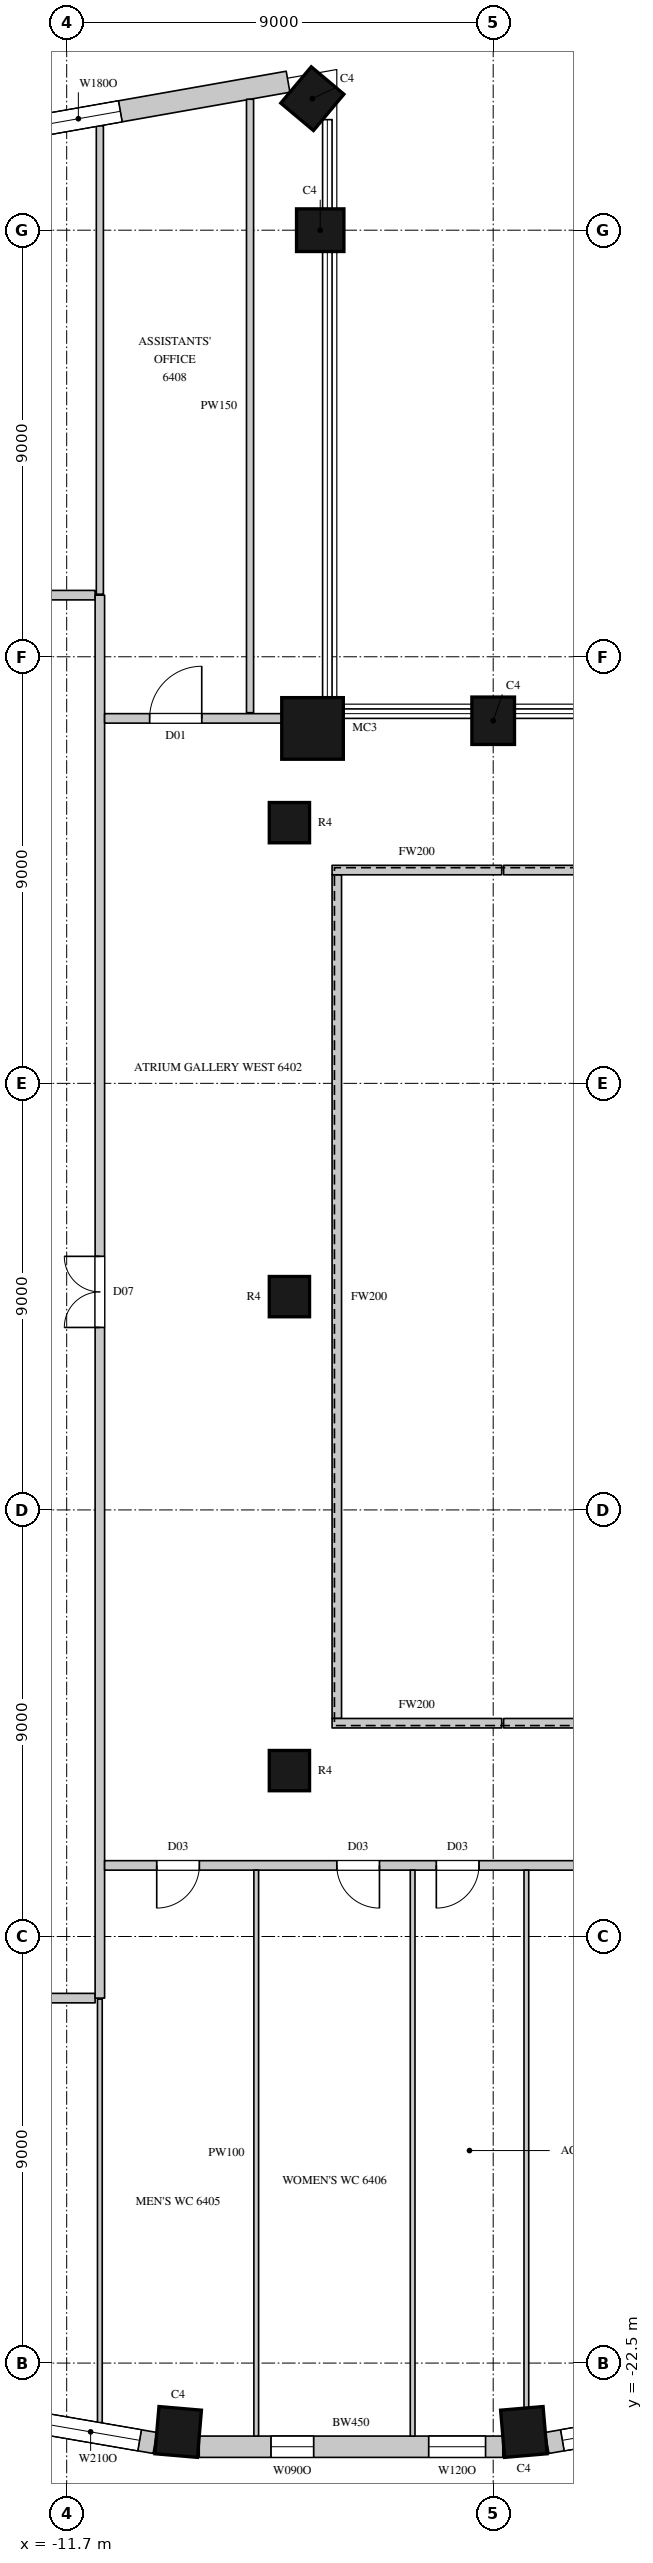
"""IFC4 building model, lengths in metres.
Left out: names, types, materials, properties, quantities, classifications, styles, units other than length and angle.
Written with IfcOpenShell. Run it as: python <this file> out.ifc"""

import sys

from ifc_helpers import new_model, si_unit, direction, frame, frame_2d, origin, origin_2d, place, context, subcontext, project, spatial, rectangle, circle, extrude, element, fill, save


model = new_model("IFC4")
c1 = context("Model", 3, precision=1e-05, world=origin(), true_north=direction((0.0, 1.0)))
c2 = subcontext(c1, "Body", "Model", "MODEL_VIEW")
j1 = project(units=[si_unit("LENGTHUNIT", "METRE"), si_unit("PLANEANGLEUNIT", "RADIAN")], contexts=[c1])
p1 = place(None, origin())
s1 = spatial("IfcSite", under=j1, at=p1, CompositionType="ELEMENT")
p2 = place(p1, origin())
s2 = spatial("IfcBuilding", under=s1, at=p2, CompositionType="ELEMENT")
p3 = place(p2, frame((0.0, 0.0, 284.4)))
s3 = spatial("IfcBuildingStorey", under=s2, at=p3, CompositionType="ELEMENT", Elevation=284.4)
p4 = place(p3, frame((-2.7, 12.15, 0.0), z_axis=(0.0, 0.0, 1.0), x_axis=(-1.0, 0.0, 0.0)))
e1 = element("IfcColumn", 1, at=p4, inside=s3, PredefinedType="COLUMN", context=c2, shape_type="SweptSolid", body=[
    extrude(rectangle(XDim=0.9, YDim=1.0, at=origin_2d()), origin(), (0.0, 0.0, 1.0), 4.1),
])
p5 = place(p3, frame((-6.512, 11.988, 0.0), z_axis=(0.0, 0.0, 1.0), x_axis=(1.0, 0.0, 0.0)))
e2 = element("IfcColumn", 2, at=p5, inside=s3, PredefinedType="COLUMN", context=c2, shape_type="SweptSolid", body=[
    extrude(circle(Radius=0.65, at=origin_2d()), origin(), (0.0, 0.0, 1.0), 4.1),
])
for number, where, z_axis, x_axis in (
    (3, (-6.35, 22.5, 0.0), (0.0, 0.0, 1.0), (0.0, 1.0, 0.0)),
    (4, (-6.516, 25.275, 0.0), (0.0, 0.0, 1.0), (-0.766, 0.643, 0.0)),
    (5, (-9.347, -23.954, 0.0), (0.0, 0.0, 1.0), (0.996, -0.085, 0.0)),
    (6, (-2.053, -23.954, 0.0), (0.0, 0.0, 1.0), (0.996, 0.085, 0.0)),
):
    element("IfcColumn", number, at=place(p3, frame(where, z_axis=z_axis, x_axis=x_axis)), inside=s3, PredefinedType="COLUMN", context=c2, shape_type="SweptSolid", body=[
        extrude(rectangle(XDim=0.9, YDim=1.0, at=origin_2d()), origin(), (0.0, 0.0, 1.0), 4.1),
    ])
for number, where, z_axis, x_axis in (
    (7, (-7.0, -10.0, 0.0), (0.0, 0.0, 1.0), (1.0, 0.0, 0.0)),
    (8, (-7.0, 0.0, 0.0), (0.0, 0.0, 1.0), (1.0, 0.0, 0.0)),
    (9, (-7.0, 10.0, 0.0), (0.0, 0.0, 1.0), (1.0, 0.0, 0.0)),
):
    element("IfcColumn", number, at=place(p3, frame(where, z_axis=z_axis, x_axis=x_axis)), inside=s3, PredefinedType="COLUMN", context=c2, shape_type="SweptSolid", body=[
        extrude(circle(Radius=0.425, at=origin_2d()), origin(), (0.0, 0.0, 1.0), 4.1),
    ])
p6 = place(p3, frame((-7.029, 25.632, 0.0), z_axis=(0.0, 0.0, 1.0), x_axis=(-0.984797606634, -0.173705710808, 0.0)))
e10 = element("IfcWall", 10, at=p6, inside=s3, PredefinedType="SOLIDWALL", context=c2, shape_type="SweptSolid", body=[
    extrude(rectangle(XDim=5.772, YDim=0.45, at=frame_2d((2.886, 0.0))), origin(), (0.0, 0.0, 1.0), 3.8),
])
p7 = place(p6, frame((3.593, 0.0, 1.05)))
e11 = element("IfcOpeningElement", 11, at=p7, cuts=e10, PredefinedType="OPENING", context=c2, shape_type="SweptSolid", body=[
    extrude(rectangle(XDim=1.8, YDim=2.4, at=frame_2d((0.9, 1.2))), frame((0.0, 0.235, 0.0), z_axis=(0.0, -1.0, 0.0), x_axis=(1.0, 0.0, 0.0)), (0.0, 0.0, 1.0), 0.47),
])
p8 = place(p3, frame((-16.157, -23.097, 0.0), z_axis=(0.0, 0.0, 1.0), x_axis=(0.985502073964, -0.169663379113, 0.0)))
e12 = element("IfcWall", 12, at=p8, inside=s3, PredefinedType="SOLIDWALL", context=c2, shape_type="SweptSolid", body=[
    extrude(rectangle(XDim=6.412, YDim=0.45, at=frame_2d((3.206, 0.0))), origin(), (0.0, 0.0, 1.0), 3.8),
])
p9 = place(p8, frame((0.327, 0.0, 1.05)))
e13 = element("IfcOpeningElement", 13, at=p9, cuts=e12, PredefinedType="OPENING", context=c2, shape_type="SweptSolid", body=[
    extrude(rectangle(XDim=2.1, YDim=2.4, at=frame_2d((1.05, 1.2))), frame((0.0, 0.235, 0.0), z_axis=(0.0, -1.0, 0.0), x_axis=(1.0, 0.0, 0.0)), (0.0, 0.0, 1.0), 0.47),
])
p10 = place(p8, frame((3.985, 0.0, 1.05)))
e14 = element("IfcOpeningElement", 14, at=p10, cuts=e12, PredefinedType="OPENING", context=c2, shape_type="SweptSolid", body=[
    extrude(rectangle(XDim=2.1, YDim=2.4, at=frame_2d((1.05, 1.2))), frame((0.0, 0.235, 0.0), z_axis=(0.0, -1.0, 0.0), x_axis=(1.0, 0.0, 0.0)), (0.0, 0.0, 1.0), 0.47),
])
p11 = place(p3, frame((-8.903, -24.265, 0.0), z_axis=(0.0, 0.0, 1.0), x_axis=(1.0, 0.0, 0.0)))
e15 = element("IfcWall", 15, at=p11, inside=s3, PredefinedType="SOLIDWALL", context=c2, shape_type="SweptSolid", body=[
    extrude(rectangle(XDim=6.406, YDim=0.45, at=frame_2d((3.203, 0.0))), origin(), (0.0, 0.0, 1.0), 3.8),
])
p12 = place(p11, frame((1.514, 0.0, 1.05)))
e16 = element("IfcOpeningElement", 16, at=p12, cuts=e15, PredefinedType="OPENING", context=c2, shape_type="SweptSolid", body=[
    extrude(rectangle(XDim=0.9, YDim=2.4, at=frame_2d((0.45, 1.2))), frame((0.0, 0.235, 0.0), z_axis=(0.0, -1.0, 0.0), x_axis=(1.0, 0.0, 0.0)), (0.0, 0.0, 1.0), 0.47),
])
p13 = place(p11, frame((4.841, 0.0, 1.05)))
e17 = element("IfcOpeningElement", 17, at=p13, cuts=e15, PredefinedType="OPENING", context=c2, shape_type="SweptSolid", body=[
    extrude(rectangle(XDim=1.2, YDim=2.4, at=frame_2d((0.6, 1.2))), frame((0.0, 0.235, 0.0), z_axis=(0.0, -1.0, 0.0), x_axis=(1.0, 0.0, 0.0)), (0.0, 0.0, 1.0), 0.47),
])
p14 = place(p3, frame((-1.562, -24.185, 0.0), z_axis=(0.0, 0.0, 1.0), x_axis=(0.985502073964, 0.169663379113, 0.0)))
e18 = element("IfcWall", 18, at=p14, inside=s3, PredefinedType="SOLIDWALL", context=c2, shape_type="SweptSolid", body=[
    extrude(rectangle(XDim=6.412, YDim=0.45, at=frame_2d((3.206, 0.0))), origin(), (0.0, 0.0, 1.0), 3.8),
])
p15 = place(p14, frame((0.327, 0.0, 1.05)))
e19 = element("IfcOpeningElement", 19, at=p15, cuts=e18, PredefinedType="OPENING", context=c2, shape_type="SweptSolid", body=[
    extrude(rectangle(XDim=2.1, YDim=2.4, at=frame_2d((1.05, 1.2))), frame((0.0, 0.235, 0.0), z_axis=(0.0, -1.0, 0.0), x_axis=(1.0, 0.0, 0.0)), (0.0, 0.0, 1.0), 0.47),
])
p16 = place(p14, frame((3.985, 0.0, 1.05)))
e20 = element("IfcOpeningElement", 20, at=p16, cuts=e18, PredefinedType="OPENING", context=c2, shape_type="SweptSolid", body=[
    extrude(rectangle(XDim=2.1, YDim=2.4, at=frame_2d((1.05, 1.2))), frame((0.0, 0.235, 0.0), z_axis=(0.0, -1.0, 0.0), x_axis=(1.0, 0.0, 0.0)), (0.0, 0.0, 1.0), 0.47),
])
for number, where, z_axis, x_axis in (
    (21, (-13.97, -14.8, 0.0), (0.0, 0.0, 1.0), (1.0, 0.0, 0.0)),
    (22, (-13.97, 14.8, 0.0), (0.0, 0.0, 1.0), (1.0, 0.0, 0.0)),
):
    element("IfcWall", number, at=place(p3, frame(where, z_axis=z_axis, x_axis=x_axis)), inside=s3, PredefinedType="PARTITIONING", context=c2, shape_type="SweptSolid", body=[
        extrude(rectangle(XDim=2.87, YDim=0.2, at=frame_2d((1.435, 0.0))), origin(), (0.0, 0.0, 1.0), 3.8),
    ])
p17 = place(p3, frame((-11.0, -14.8, 0.0), z_axis=(0.0, 0.0, 1.0), x_axis=(0.0, 1.0, 0.0)))
e23 = element("IfcWall", 23, at=p17, inside=s3, PredefinedType="PARTITIONING", context=c2, shape_type="SweptSolid", body=[
    extrude(rectangle(XDim=29.6, YDim=0.2, at=frame_2d((14.8, 0.0))), origin(), (0.0, 0.0, 1.0), 3.8),
])
p18 = place(p17, frame((14.15, 0.0, 0.0)))
e24 = element("IfcOpeningElement", 24, at=p18, cuts=e23, PredefinedType="OPENING", context=c2, shape_type="SweptSolid", body=[
    extrude(rectangle(XDim=1.5, YDim=2.4, at=frame_2d((0.75, 1.2))), frame((0.0, 0.11, 0.0), z_axis=(0.0, -1.0, 0.0), x_axis=(1.0, 0.0, 0.0)), (0.0, 0.0, 1.0), 0.22),
])
p19 = place(p3, frame((-10.9, -12.0, 0.0), z_axis=(0.0, 0.0, 1.0), x_axis=(1.0, 0.0, 0.0)))
e25 = element("IfcWall", 25, at=p19, inside=s3, PredefinedType="PARTITIONING", context=c2, shape_type="SweptSolid", body=[
    extrude(rectangle(XDim=21.8, YDim=0.2, at=frame_2d((10.9, 0.0))), origin(), (0.0, 0.0, 1.0), 3.8),
])
p20 = place(p19, frame((1.1, 0.0, 0.0)))
e26 = element("IfcOpeningElement", 26, at=p20, cuts=e25, PredefinedType="OPENING", context=c2, shape_type="SweptSolid", body=[
    extrude(rectangle(XDim=0.9, YDim=2.2, at=frame_2d((0.45, 1.1))), frame((0.0, 0.11, 0.0), z_axis=(0.0, -1.0, 0.0), x_axis=(1.0, 0.0, 0.0)), (0.0, 0.0, 1.0), 0.22),
])
p21 = place(p19, frame((4.9, 0.0, 0.0)))
e27 = element("IfcOpeningElement", 27, at=p21, cuts=e25, PredefinedType="OPENING", context=c2, shape_type="SweptSolid", body=[
    extrude(rectangle(XDim=0.9, YDim=2.2, at=frame_2d((0.45, 1.1))), frame((0.0, 0.11, 0.0), z_axis=(0.0, -1.0, 0.0), x_axis=(1.0, 0.0, 0.0)), (0.0, 0.0, 1.0), 0.22),
])
p22 = place(p19, frame((7.0, 0.0, 0.0)))
e28 = element("IfcOpeningElement", 28, at=p22, cuts=e25, PredefinedType="OPENING", context=c2, shape_type="SweptSolid", body=[
    extrude(rectangle(XDim=0.9, YDim=2.2, at=frame_2d((0.45, 1.1))), frame((0.0, 0.11, 0.0), z_axis=(0.0, -1.0, 0.0), x_axis=(1.0, 0.0, 0.0)), (0.0, 0.0, 1.0), 0.22),
])
p23 = place(p19, frame((9.95, 0.0, 0.0)))
e29 = element("IfcOpeningElement", 29, at=p23, cuts=e25, PredefinedType="OPENING", context=c2, shape_type="SweptSolid", body=[
    extrude(rectangle(XDim=1.1, YDim=2.4, at=frame_2d((0.55, 1.2))), frame((0.0, 0.11, 0.0), z_axis=(0.0, -1.0, 0.0), x_axis=(1.0, 0.0, 0.0)), (0.0, 0.0, 1.0), 0.22),
])
p24 = place(p3, frame((-10.9, 12.2, 0.0), z_axis=(0.0, 0.0, 1.0), x_axis=(1.0, 0.0, 0.0)))
e30 = element("IfcWall", 30, at=p24, inside=s3, PredefinedType="PARTITIONING", context=c2, shape_type="SweptSolid", body=[
    extrude(rectangle(XDim=3.756, YDim=0.2, at=frame_2d((1.878, 0.0))), origin(), (0.0, 0.0, 1.0), 3.8),
])
p25 = place(p24, frame((0.95, 0.0, 0.0)))
e31 = element("IfcOpeningElement", 31, at=p25, cuts=e30, PredefinedType="OPENING", context=c2, shape_type="SweptSolid", body=[
    extrude(rectangle(XDim=1.1, YDim=2.4, at=frame_2d((0.55, 1.2))), frame((0.0, 0.11, 0.0), z_axis=(0.0, -1.0, 0.0), x_axis=(1.0, 0.0, 0.0)), (0.0, 0.0, 1.0), 0.22),
])
p26 = place(p3, frame((-6.0, -8.9, 0.0), z_axis=(0.0, 0.0, 1.0), x_axis=(0.0, 1.0, 0.0)))
e32 = element("IfcWall", 32, at=p26, inside=s3, PredefinedType="PARTITIONING", context=c2, shape_type="SweptSolid", body=[
    extrude(rectangle(XDim=17.8, YDim=0.2, at=frame_2d((8.9, 0.0))), origin(), (0.0, 0.0, 1.0), 3.8),
])
for number, where, z_axis, x_axis in (
    (33, (-6.1, -9.0, 0.0), (0.0, 0.0, 1.0), (1.0, 0.0, 0.0)),
    (34, (-6.1, 9.0, 0.0), (0.0, 0.0, 1.0), (1.0, 0.0, 0.0)),
):
    element("IfcWall", number, at=place(p3, frame(where, z_axis=z_axis, x_axis=x_axis)), inside=s3, PredefinedType="PARTITIONING", context=c2, shape_type="SweptSolid", body=[
        extrude(rectangle(XDim=3.58, YDim=0.2, at=frame_2d((1.79, 0.0))), origin(), (0.0, 0.0, 1.0), 3.8),
    ])
for number, where, z_axis, x_axis in (
    (35, (-2.48, -9.0, 0.0), (0.0, 0.0, 1.0), (1.0, 0.0, 0.0)),
    (36, (-2.48, 9.0, 0.0), (0.0, 0.0, 1.0), (1.0, 0.0, 0.0)),
):
    element("IfcWall", number, at=place(p3, frame(where, z_axis=z_axis, x_axis=x_axis)), inside=s3, PredefinedType="PARTITIONING", context=c2, shape_type="SweptSolid", body=[
        extrude(rectangle(XDim=10.58, YDim=0.2, at=frame_2d((5.29, 0.0))), origin(), (0.0, 0.0, 1.0), 3.8),
    ])
p27 = place(p3, frame((-11.0, 14.82, 0.0), z_axis=(0.0, 0.0, 1.0), x_axis=(0.0, 1.0, 0.0)))
e37 = element("IfcWall", 37, at=p27, inside=s3, PredefinedType="PARTITIONING", context=c2, shape_type="SweptSolid", body=[
    extrude(rectangle(XDim=9.883, YDim=0.15, at=frame_2d((4.942, 0.0))), origin(), (0.0, 0.0, 1.0), 3.8),
])
p28 = place(p3, frame((-7.831, 12.32, 0.0), z_axis=(0.0, 0.0, 1.0), x_axis=(0.0, 1.0, 0.0)))
e38 = element("IfcWall", 38, at=p28, inside=s3, PredefinedType="PARTITIONING", context=c2, shape_type="SweptSolid", body=[
    extrude(rectangle(XDim=12.942, YDim=0.15, at=frame_2d((6.471, 0.0))), origin(), (0.0, 0.0, 1.0), 3.8),
])
p29 = place(p3, frame((-11.0, -23.757, 0.0), z_axis=(0.0, 0.0, 1.0), x_axis=(0.0, 1.0, 0.0)))
e39 = element("IfcWall", 39, at=p29, inside=s3, PredefinedType="PARTITIONING", context=c2, shape_type="SweptSolid", body=[
    extrude(rectangle(XDim=8.937, YDim=0.1, at=frame_2d((4.468, 0.0))), origin(), (0.0, 0.0, 1.0), 3.8),
])
for number, where, z_axis, x_axis in (
    (40, (-7.7, -24.04, 0.0), (0.0, 0.0, 1.0), (0.0, 1.0, 0.0)),
    (41, (-4.4, -24.04, 0.0), (0.0, 0.0, 1.0), (0.0, 1.0, 0.0)),
):
    element("IfcWall", number, at=place(p3, frame(where, z_axis=z_axis, x_axis=x_axis)), inside=s3, PredefinedType="PARTITIONING", context=c2, shape_type="SweptSolid", body=[
        extrude(rectangle(XDim=11.94, YDim=0.1, at=frame_2d((5.97, 0.0))), origin(), (0.0, 0.0, 1.0), 3.8),
    ])
p30 = place(p3, frame((-2.0, -23.447, 0.0), z_axis=(0.0, 0.0, 1.0), x_axis=(0.0, 1.0, 0.0)))
e42 = element("IfcWall", 42, at=p30, inside=s3, PredefinedType="PARTITIONING", context=c2, shape_type="SweptSolid", body=[
    extrude(rectangle(XDim=11.347, YDim=0.1, at=frame_2d((5.674, 0.0))), origin(), (0.0, 0.0, 1.0), 3.8),
])
p31 = place(p7, origin())
e43 = element("IfcWindow", 43, at=p31, inside=s3, PartitioningType="SINGLE_PANEL", PredefinedType="WINDOW", context=c2, shape_type="SweptSolid", body=[
    extrude(rectangle(XDim=1.8, YDim=2.4, at=frame_2d((0.9, 1.2))), frame((0.0, 0.135, 0.0), z_axis=(0.0, -1.0, 0.0), x_axis=(1.0, 0.0, 0.0)), (0.0, 0.0, 1.0), 0.06),
])
fill(e11, e43)
p32 = place(p10, origin())
e44 = element("IfcWindow", 44, at=p32, inside=s3, PartitioningType="SINGLE_PANEL", PredefinedType="WINDOW", context=c2, shape_type="SweptSolid", body=[
    extrude(rectangle(XDim=2.1, YDim=2.4, at=frame_2d((1.05, 1.2))), frame((0.0, 0.135, 0.0), z_axis=(0.0, -1.0, 0.0), x_axis=(1.0, 0.0, 0.0)), (0.0, 0.0, 1.0), 0.06),
])
fill(e14, e44)
p33 = place(p15, origin())
e45 = element("IfcWindow", 45, at=p33, inside=s3, PartitioningType="SINGLE_PANEL", PredefinedType="WINDOW", context=c2, shape_type="SweptSolid", body=[
    extrude(rectangle(XDim=2.1, YDim=2.4, at=frame_2d((1.05, 1.2))), frame((0.0, 0.135, 0.0), z_axis=(0.0, -1.0, 0.0), x_axis=(1.0, 0.0, 0.0)), (0.0, 0.0, 1.0), 0.06),
])
fill(e19, e45)
p34 = place(p18, origin())
e46 = element("IfcDoor", 46, at=p34, inside=s3, OperationType="DOUBLE_DOOR_SINGLE_SWING", PredefinedType="DOOR", context=c2, shape_type="SweptSolid", body=[
    extrude(rectangle(XDim=1.5, YDim=2.4, at=frame_2d((0.75, 1.2))), frame((0.0, 0.025, 0.0), z_axis=(0.0, -1.0, 0.0), x_axis=(1.0, 0.0, 0.0)), (0.0, 0.0, 1.0), 0.05),
])
fill(e24, e46)
p35 = place(p20, origin())
e47 = element("IfcDoor", 47, at=p35, inside=s3, OperationType="SINGLE_SWING_RIGHT", PredefinedType="DOOR", context=c2, shape_type="SweptSolid", body=[
    extrude(rectangle(XDim=0.9, YDim=2.2, at=frame_2d((0.45, 1.1))), frame((0.0, 0.025, 0.0), z_axis=(0.0, -1.0, 0.0), x_axis=(1.0, 0.0, 0.0)), (0.0, 0.0, 1.0), 0.05),
])
fill(e26, e47)
p36 = place(p21, origin())
e48 = element("IfcDoor", 48, at=p36, inside=s3, OperationType="SINGLE_SWING_LEFT", PredefinedType="DOOR", context=c2, shape_type="SweptSolid", body=[
    extrude(rectangle(XDim=0.9, YDim=2.2, at=frame_2d((0.45, 1.1))), frame((0.0, 0.025, 0.0), z_axis=(0.0, -1.0, 0.0), x_axis=(1.0, 0.0, 0.0)), (0.0, 0.0, 1.0), 0.05),
])
fill(e27, e48)
p37 = place(p22, origin())
e49 = element("IfcDoor", 49, at=p37, inside=s3, OperationType="SINGLE_SWING_RIGHT", PredefinedType="DOOR", context=c2, shape_type="SweptSolid", body=[
    extrude(rectangle(XDim=0.9, YDim=2.2, at=frame_2d((0.45, 1.1))), frame((0.0, 0.025, 0.0), z_axis=(0.0, -1.0, 0.0), x_axis=(1.0, 0.0, 0.0)), (0.0, 0.0, 1.0), 0.05),
])
fill(e28, e49)
p38 = place(p25, origin())
e50 = element("IfcDoor", 50, at=p38, inside=s3, OperationType="SINGLE_SWING_RIGHT", PredefinedType="DOOR", context=c2, shape_type="SweptSolid", body=[
    extrude(rectangle(XDim=1.1, YDim=2.4, at=frame_2d((0.55, 1.2))), frame((0.0, 0.025, 0.0), z_axis=(0.0, -1.0, 0.0), x_axis=(1.0, 0.0, 0.0)), (0.0, 0.0, 1.0), 0.05),
])
fill(e31, e50)
p39 = place(p12, origin())
e51 = element("IfcWindow", 51, at=p39, inside=s3, PartitioningType="SINGLE_PANEL", PredefinedType="WINDOW", context=c2, shape_type="SweptSolid", body=[
    extrude(rectangle(XDim=0.9, YDim=2.4, at=frame_2d((0.45, 1.2))), frame((0.0, 0.135, 0.0), z_axis=(0.0, -1.0, 0.0), x_axis=(1.0, 0.0, 0.0)), (0.0, 0.0, 1.0), 0.06),
])
fill(e16, e51)
p40 = place(p13, origin())
e52 = element("IfcWindow", 52, at=p40, inside=s3, PartitioningType="SINGLE_PANEL", PredefinedType="WINDOW", context=c2, shape_type="SweptSolid", body=[
    extrude(rectangle(XDim=1.2, YDim=2.4, at=frame_2d((0.6, 1.2))), frame((0.0, 0.135, 0.0), z_axis=(0.0, -1.0, 0.0), x_axis=(1.0, 0.0, 0.0)), (0.0, 0.0, 1.0), 0.06),
])
fill(e17, e52)
save(model, sys.argv[1])
